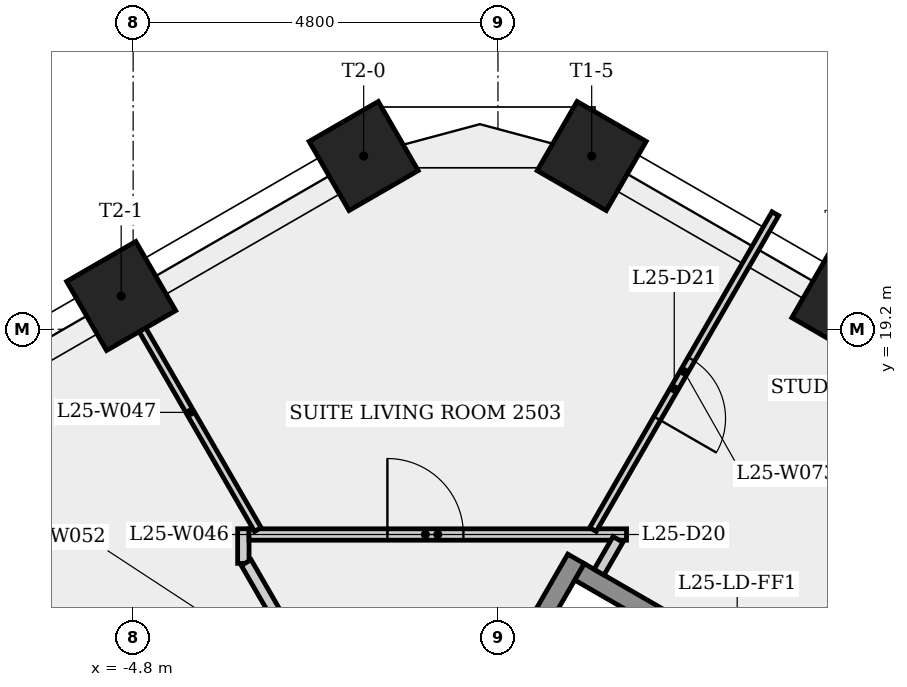
"""IFC4 building model, lengths in metres.
Left out: names, types, materials, properties, quantities, classifications, styles, units other than length and angle.
Written with IfcOpenShell. Run it as: python <this file> out.ifc"""

import sys

from ifc_helpers import new_model, si_unit, direction, frame, frame_2d, origin, origin_2d, place, context, subcontext, project, spatial, rectangle, extrude, element, fill, save


model = new_model("IFC4")
c1 = context("Model", 3, precision=1e-05, world=origin(), true_north=direction((0.0, 1.0)))
c2 = subcontext(c1, "Body", "Model", "MODEL_VIEW")
j1 = project(units=[si_unit("LENGTHUNIT", "METRE"), si_unit("PLANEANGLEUNIT", "RADIAN")], contexts=[c1])
p1 = place(None, origin())
s1 = spatial("IfcSite", under=j1, at=p1, CompositionType="ELEMENT")
p2 = place(p1, origin())
s2 = spatial("IfcBuilding", under=s1, at=p2, CompositionType="ELEMENT")
p3 = place(p2, frame((0.0, 0.0, 96.7)))
s3 = spatial("IfcBuildingStorey", under=s2, at=p3, CompositionType="ELEMENT", Elevation=96.7)
for number, where, z_axis, x_axis in (
    (1, (4.583, 19.545, 0.0), (0.0, 0.0, 1.0), (0.5, 0.866, 0.0)),
    (2, (1.233, 21.48, 0.0), (0.0, 0.0, 1.0), (0.5, 0.866, 0.0)),
    (3, (-1.767, 21.48, 0.0), (0.0, 0.0, 1.0), (-0.5, 0.866, 0.0)),
    (4, (-4.957, 19.638, 0.0), (0.0, 0.0, 1.0), (-0.5, 0.866, 0.0)),
):
    element("IfcColumn", number, at=place(p3, frame(where, z_axis=z_axis, x_axis=x_axis)), inside=s3, PredefinedType="COLUMN", context=c2, shape_type="SweptSolid", body=[
        extrude(rectangle(XDim=1.05, YDim=1.05, at=origin_2d()), origin(), (0.0, 0.0, 1.0), 3.4),
    ])
p4 = place(p3, frame((-4.286, 11.122, 0.0), z_axis=(0.0, 0.0, 1.0), x_axis=(-0.499997453958, 0.866026873738, 0.0)))
e5 = element("IfcWall", 5, at=p4, inside=s3, PredefinedType="PARTITIONING", context=c2, shape_type="SweptSolid", body=[
    extrude(rectangle(XDim=7.71, YDim=0.1, at=frame_2d((3.855, 0.0))), origin(), (0.0, 0.0, 1.0), 3.05),
])
p5 = place(p3, frame((-3.35, 16.12, 0.0), z_axis=(0.0, 0.0, 1.0), x_axis=(0.0, 1.0, 0.0)))
e6 = element("IfcWall", 6, at=p5, inside=s3, PredefinedType="PARTITIONING", context=c2, shape_type="SweptSolid", body=[
    extrude(rectangle(XDim=0.455, YDim=0.15, at=frame_2d((0.227, 0.0))), origin(), (0.0, 0.0, 1.0), 3.05),
])
p6 = place(p3, frame((-3.275, 16.5, 0.0), z_axis=(0.0, 0.0, 1.0), x_axis=(1.0, 0.0, 0.0)))
e7 = element("IfcWall", 7, at=p6, inside=s3, PredefinedType="PARTITIONING", context=c2, shape_type="SweptSolid", body=[
    extrude(rectangle(XDim=4.966, YDim=0.15, at=frame_2d((2.483, 0.0))), origin(), (0.0, 0.0, 1.0), 3.05),
])
p7 = place(p6, frame((1.82, 0.0, 0.0)))
e8 = element("IfcOpeningElement", 8, at=p7, cuts=e7, PredefinedType="OPENING", context=c2, shape_type="SweptSolid", body=[
    extrude(rectangle(XDim=1.0, YDim=2.1, at=frame_2d((0.5, 1.05))), frame((0.0, 0.085, 0.0), z_axis=(0.0, -1.0, 0.0), x_axis=(1.0, 0.0, 0.0)), (0.0, 0.0, 1.0), 0.17),
])
p8 = place(p3, frame((-3.159, 16.565, 0.0), z_axis=(0.0, 0.0, 1.0), x_axis=(-0.499951970318, 0.866053131959, 0.0)))
e9 = element("IfcWall", 9, at=p8, inside=s3, PredefinedType="PARTITIONING", context=c2, shape_type="SweptSolid", body=[
    extrude(rectangle(XDim=3.56, YDim=0.1, at=frame_2d((1.78, 0.0))), origin(), (0.0, 0.0, 1.0), 3.05),
])
p9 = place(p3, frame((-1.387, 12.796, 0.0), z_axis=(0.0, 0.0, 1.0), x_axis=(-0.500006057782, 0.866021906294, 0.0)))
e10 = element("IfcWall", 10, at=p9, inside=s3, PredefinedType="PARTITIONING", context=c2, shape_type="SweptSolid", body=[
    extrude(rectangle(XDim=3.85, YDim=0.15, at=frame_2d((1.925, 0.0))), origin(), (0.0, 0.0, 1.0), 3.05),
])
p10 = place(p9, frame((1.425, 0.0, 0.0)))
e11 = element("IfcOpeningElement", 11, at=p10, cuts=e10, PredefinedType="OPENING", context=c2, shape_type="SweptSolid", body=[
    extrude(rectangle(XDim=1.0, YDim=2.1, at=frame_2d((0.5, 1.05))), frame((0.0, 0.085, 0.0), z_axis=(0.0, -1.0, 0.0), x_axis=(1.0, 0.0, 0.0)), (0.0, 0.0, 1.0), 0.17),
])
p11 = place(p3, frame((-0.403, 13.702, 0.0), z_axis=(0.0, 0.0, 1.0), x_axis=(0.499976111731, 0.866039195244, 0.0)))
e12 = element("IfcWall", 12, at=p11, inside=s3, PredefinedType="SHEAR", context=c2, shape_type="SweptSolid", body=[
    extrude(rectangle(XDim=2.861, YDim=0.25, at=frame_2d((1.43, 0.0))), origin(), (0.0, 0.0, 1.0), 3.05),
])
p12 = place(p3, frame((1.073, 16.008, 0.0), z_axis=(0.0, 0.0, 1.0), x_axis=(0.866040211805, -0.499974350878, 0.0)))
e13 = element("IfcWall", 13, at=p12, inside=s3, PredefinedType="SHEAR", context=c2, shape_type="SweptSolid", body=[
    extrude(rectangle(XDim=3.3, YDim=0.25, at=frame_2d((1.65, 0.0))), origin(), (0.0, 0.0, 1.0), 3.05),
])
p13 = place(p3, frame((1.579, 16.435, 0.0), z_axis=(0.0, 0.0, 1.0), x_axis=(-0.500359323436, -0.865817848887, 0.0)))
e14 = element("IfcWall", 14, at=p13, inside=s3, PredefinedType="PARTITIONING", context=c2, shape_type="SweptSolid", body=[
    extrude(rectangle(XDim=0.498, YDim=0.15, at=frame_2d((0.249, 0.0))), origin(), (0.0, 0.0, 1.0), 3.05),
])
p14 = place(p3, frame((3.649, 20.721, 0.0), z_axis=(0.0, 0.0, 1.0), x_axis=(-0.499991085587, -0.866030550462, 0.0)))
e15 = element("IfcWall", 15, at=p14, inside=s3, PredefinedType="PARTITIONING", context=c2, shape_type="SweptSolid", body=[
    extrude(rectangle(XDim=4.799, YDim=0.1, at=frame_2d((2.399, 0.0))), origin(), (0.0, 0.0, 1.0), 3.05),
])
p15 = place(p14, frame((2.21, 0.0, 0.0)))
e16 = element("IfcOpeningElement", 16, at=p15, cuts=e15, PredefinedType="OPENING", context=c2, shape_type="SweptSolid", body=[
    extrude(rectangle(XDim=0.9, YDim=2.1, at=frame_2d((0.45, 1.05))), frame((0.0, 0.06, 0.0), z_axis=(0.0, -1.0, 0.0), x_axis=(1.0, 0.0, 0.0)), (0.0, 0.0, 1.0), 0.12),
])
p16 = place(p7, origin())
e17 = element("IfcDoor", 17, at=p16, inside=s3, OperationType="SINGLE_SWING_LEFT", PredefinedType="DOOR", context=c2, shape_type="SweptSolid", body=[
    extrude(rectangle(XDim=1.0, YDim=2.1, at=frame_2d((0.5, 1.05))), frame((0.0, 0.025, 0.0), z_axis=(0.0, -1.0, 0.0), x_axis=(1.0, 0.0, 0.0)), (0.0, 0.0, 1.0), 0.05),
])
fill(e8, e17)
p17 = place(p15, origin())
e18 = element("IfcDoor", 18, at=p17, inside=s3, OperationType="SINGLE_SWING_RIGHT", PredefinedType="DOOR", context=c2, shape_type="SweptSolid", body=[
    extrude(rectangle(XDim=0.9, YDim=2.1, at=frame_2d((0.45, 1.05))), frame((0.0, 0.025, 0.0), z_axis=(0.0, -1.0, 0.0), x_axis=(1.0, 0.0, 0.0)), (0.0, 0.0, 1.0), 0.05),
])
fill(e16, e18)
save(model, sys.argv[1])
